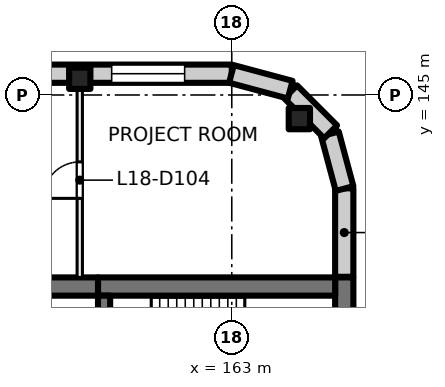
"""IFC4 building model, lengths in metres.
Left out: names, types, materials, properties, quantities, classifications, styles, units other than length and angle.
Written with IfcOpenShell. Run it as: python <this file> out.ifc"""

import sys

from ifc_helpers import new_model, si_unit, direction, frame, frame_2d, origin, origin_2d, place, context, subcontext, project, spatial, rectangle, extrude, element, fill, save


model = new_model("IFC4")
c1 = context("Model", 3, precision=1e-05, world=origin(), true_north=direction((0.0, 1.0)))
c2 = subcontext(c1, "Body", "Model", "MODEL_VIEW")
j1 = project(units=[si_unit("LENGTHUNIT", "METRE"), si_unit("PLANEANGLEUNIT", "RADIAN")], contexts=[c1])
p1 = place(None, origin())
s1 = spatial("IfcSite", under=j1, at=p1, CompositionType="ELEMENT")
p2 = place(p1, origin())
s2 = spatial("IfcBuilding", under=s1, at=p2, CompositionType="ELEMENT")
p3 = place(p2, frame((0.0, 0.0, 81.0)))
s3 = spatial("IfcBuildingStorey", under=s2, at=p3, CompositionType="ELEMENT", Elevation=81.0)
for number, where, z_axis, x_axis in (
    (1, (165.223, 144.223, 0.0), (0.0, 0.0, 1.0), (1.0, 0.0, 0.0)),
    (2, (158.0, 145.55, 0.0), (0.0, 0.0, 1.0), (1.0, 0.0, 0.0)),
):
    element("IfcColumn", number, at=place(p3, frame(where, z_axis=z_axis, x_axis=x_axis)), inside=s3, PredefinedType="COLUMN", context=c2, shape_type="SweptSolid", body=[
        extrude(rectangle(XDim=0.7, YDim=0.7, at=origin_2d()), origin(), (0.0, 0.0, 1.0), 4.0),
    ])
p4 = place(p3, frame((166.7, 139.0, 0.0), z_axis=(0.0, 0.0, 1.0), x_axis=(0.0, -1.0, 0.0)))
e3 = element("IfcWall", 3, at=p4, inside=s3, PredefinedType="SHEAR", context=c2, shape_type="SweptSolid", body=[
    extrude(rectangle(XDim=3.8, YDim=0.6, at=frame_2d((1.9, 0.0))), origin(), (0.0, 0.0, 1.0), 4.0),
])
p5 = place(p3, frame((166.4, 138.7, 0.0), z_axis=(0.0, 0.0, 1.0), x_axis=(-1.0, 0.0, 0.0)))
e4 = element("IfcWall", 4, at=p5, inside=s3, PredefinedType="SHEAR", context=c2, shape_type="SweptSolid", body=[
    extrude(rectangle(XDim=7.8, YDim=0.6, at=frame_2d((3.9, 0.0))), origin(), (0.0, 0.0, 1.0), 4.0),
])
p6 = place(p3, frame((158.6, 138.7, 0.0), z_axis=(0.0, 0.0, 1.0), x_axis=(-1.0, 0.0, 0.0)))
e5 = element("IfcWall", 5, at=p6, inside=s3, PredefinedType="SHEAR", context=c2, shape_type="SweptSolid", body=[
    extrude(rectangle(XDim=4.6, YDim=0.6, at=frame_2d((2.3, 0.0))), origin(), (0.0, 0.0, 1.0), 4.0),
])
p7 = place(p3, frame((158.8, 138.4, 0.0), z_axis=(0.0, 0.0, 1.0), x_axis=(0.0, -1.0, 0.0)))
e6 = element("IfcWall", 6, at=p7, inside=s3, PredefinedType="SHEAR", context=c2, shape_type="SweptSolid", body=[
    extrude(rectangle(XDim=2.8, YDim=0.4, at=frame_2d((1.4, 0.0))), origin(), (0.0, 0.0, 1.0), 4.0),
])
p8 = place(p7, frame((0.9, 0.0, 0.0)))
e7 = element("IfcOpeningElement", 7, at=p8, cuts=e6, PredefinedType="OPENING", context=c2, shape_type="SweptSolid", body=[
    extrude(rectangle(XDim=1.0, YDim=2.1, at=frame_2d((0.5, 1.05))), frame((0.0, 0.21, 0.0), z_axis=(0.0, -1.0, 0.0), x_axis=(1.0, 0.0, 0.0)), (0.0, 0.0, 1.0), 0.42),
])
p9 = place(p3, frame((131.07, 145.7, 0.0), z_axis=(0.0, 0.0, 1.0), x_axis=(1.0, 0.0, 0.0)))
e8 = element("IfcWall", 8, at=p9, inside=s3, PredefinedType="SOLIDWALL", context=c2, shape_type="SweptSolid", body=[
    extrude(rectangle(XDim=31.93, YDim=0.6, at=frame_2d((15.965, 0.0))), origin(), (0.0, 0.0, 1.0), 3.625),
])
p10 = place(p9, frame((0.98, 0.0, 0.9)))
e9 = element("IfcOpeningElement", 9, at=p10, cuts=e8, PredefinedType="OPENING", context=c2, shape_type="SweptSolid", body=[
    extrude(rectangle(XDim=2.4, YDim=2.4, at=frame_2d((1.2, 1.2))), frame((0.0, 0.31, 0.0), z_axis=(0.0, -1.0, 0.0), x_axis=(1.0, 0.0, 0.0)), (0.0, 0.0, 1.0), 0.62),
])
p11 = place(p9, frame((5.48, 0.0, 0.9)))
e10 = element("IfcOpeningElement", 10, at=p11, cuts=e8, PredefinedType="OPENING", context=c2, shape_type="SweptSolid", body=[
    extrude(rectangle(XDim=2.4, YDim=2.4, at=frame_2d((1.2, 1.2))), frame((0.0, 0.31, 0.0), z_axis=(0.0, -1.0, 0.0), x_axis=(1.0, 0.0, 0.0)), (0.0, 0.0, 1.0), 0.62),
])
p12 = place(p9, frame((9.98, 0.0, 0.9)))
e11 = element("IfcOpeningElement", 11, at=p12, cuts=e8, PredefinedType="OPENING", context=c2, shape_type="SweptSolid", body=[
    extrude(rectangle(XDim=2.4, YDim=2.4, at=frame_2d((1.2, 1.2))), frame((0.0, 0.31, 0.0), z_axis=(0.0, -1.0, 0.0), x_axis=(1.0, 0.0, 0.0)), (0.0, 0.0, 1.0), 0.62),
])
p13 = place(p9, frame((14.48, 0.0, 0.9)))
e12 = element("IfcOpeningElement", 12, at=p13, cuts=e8, PredefinedType="OPENING", context=c2, shape_type="SweptSolid", body=[
    extrude(rectangle(XDim=2.4, YDim=2.4, at=frame_2d((1.2, 1.2))), frame((0.0, 0.31, 0.0), z_axis=(0.0, -1.0, 0.0), x_axis=(1.0, 0.0, 0.0)), (0.0, 0.0, 1.0), 0.62),
])
p14 = place(p9, frame((18.98, 0.0, 0.9)))
e13 = element("IfcOpeningElement", 13, at=p14, cuts=e8, PredefinedType="OPENING", context=c2, shape_type="SweptSolid", body=[
    extrude(rectangle(XDim=2.4, YDim=2.4, at=frame_2d((1.2, 1.2))), frame((0.0, 0.31, 0.0), z_axis=(0.0, -1.0, 0.0), x_axis=(1.0, 0.0, 0.0)), (0.0, 0.0, 1.0), 0.62),
])
p15 = place(p9, frame((23.48, 0.0, 0.9)))
e14 = element("IfcOpeningElement", 14, at=p15, cuts=e8, PredefinedType="OPENING", context=c2, shape_type="SweptSolid", body=[
    extrude(rectangle(XDim=2.4, YDim=2.4, at=frame_2d((1.2, 1.2))), frame((0.0, 0.31, 0.0), z_axis=(0.0, -1.0, 0.0), x_axis=(1.0, 0.0, 0.0)), (0.0, 0.0, 1.0), 0.62),
])
p16 = place(p9, frame((27.98, 0.0, 0.9)))
e15 = element("IfcOpeningElement", 15, at=p16, cuts=e8, PredefinedType="OPENING", context=c2, shape_type="SweptSolid", body=[
    extrude(rectangle(XDim=2.4, YDim=2.4, at=frame_2d((1.2, 1.2))), frame((0.0, 0.31, 0.0), z_axis=(0.0, -1.0, 0.0), x_axis=(1.0, 0.0, 0.0)), (0.0, 0.0, 1.0), 0.62),
])
p17 = place(p3, frame((166.7, 141.93, 0.0), z_axis=(0.0, 0.0, 1.0), x_axis=(0.0, -1.0, 0.0)))
e16 = element("IfcWall", 16, at=p17, inside=s3, PredefinedType="SOLIDWALL", context=c2, shape_type="SweptSolid", body=[
    extrude(rectangle(XDim=2.91, YDim=0.6, at=frame_2d((1.455, 0.0))), origin(), (0.0, 0.0, 1.0), 3.625),
])
for number, where, z_axis, x_axis in (
    (17, (166.229, 143.719, 0.0), (0.0, 0.0, 1.0), (0.259, -0.966, 0.0)),
    (18, (164.936, 145.104, 0.0), (0.0, 0.0, 1.0), (0.707, -0.707, 0.0)),
):
    element("IfcWall", number, at=place(p3, frame(where, z_axis=z_axis, x_axis=x_axis)), inside=s3, PredefinedType="SOLIDWALL", context=c2, shape_type="SweptSolid", body=[
        extrude(rectangle(XDim=1.861, YDim=0.6, at=frame_2d((0.93, 0.0))), origin(), (0.0, 0.0, 1.0), 3.625),
    ])
p18 = place(p3, frame((162.99, 145.692, 0.0), z_axis=(0.0, 0.0, 1.0), x_axis=(0.965920269068, -0.258839784042, 0.0)))
e19 = element("IfcWall", 19, at=p18, inside=s3, PredefinedType="SOLIDWALL", context=c2, shape_type="SweptSolid", body=[
    extrude(rectangle(XDim=2.0, YDim=0.6, at=frame_2d((1.0, 0.0))), origin(), (0.0, 0.0, 1.0), 3.625),
])
p19 = place(p3, frame((158.0, 139.0, 0.0), z_axis=(0.0, 0.0, 1.0), x_axis=(0.0, 1.0, 0.0)))
e20 = element("IfcWall", 20, at=p19, inside=s3, PredefinedType="PARTITIONING", context=c2, shape_type="SweptSolid", body=[
    extrude(rectangle(XDim=6.4, YDim=0.175, at=frame_2d((3.2, 0.0))), origin(), (0.0, 0.0, 1.0), 3.625),
])
p20 = place(p19, frame((2.6, 0.0, 0.0)))
e21 = element("IfcOpeningElement", 21, at=p20, cuts=e20, PredefinedType="OPENING", context=c2, shape_type="SweptSolid", body=[
    extrude(rectangle(XDim=1.2, YDim=2.1, at=frame_2d((0.6, 1.05))), frame((0.0, 0.097, 0.0), z_axis=(0.0, -1.0, 0.0), x_axis=(1.0, 0.0, 0.0)), (0.0, 0.0, 1.0), 0.195),
])
p21 = place(p16, origin())
e22 = element("IfcWindow", 22, at=p21, inside=s3, PartitioningType="SINGLE_PANEL", PredefinedType="WINDOW", context=c2, shape_type="SweptSolid", body=[
    extrude(rectangle(XDim=2.4, YDim=2.4, at=frame_2d((1.2, 1.2))), frame((0.0, 0.03, 0.0), z_axis=(0.0, -1.0, 0.0), x_axis=(1.0, 0.0, 0.0)), (0.0, 0.0, 1.0), 0.06),
])
fill(e15, e22)
p22 = place(p20, origin())
e23 = element("IfcDoor", 23, at=p22, inside=s3, OperationType="DOUBLE_DOOR_SINGLE_SWING", PredefinedType="DOOR", context=c2, shape_type="SweptSolid", body=[
    extrude(rectangle(XDim=1.2, YDim=2.1, at=frame_2d((0.6, 1.05))), frame((0.0, 0.025, 0.0), z_axis=(0.0, -1.0, 0.0), x_axis=(1.0, 0.0, 0.0)), (0.0, 0.0, 1.0), 0.05),
])
fill(e21, e23)
save(model, sys.argv[1])
